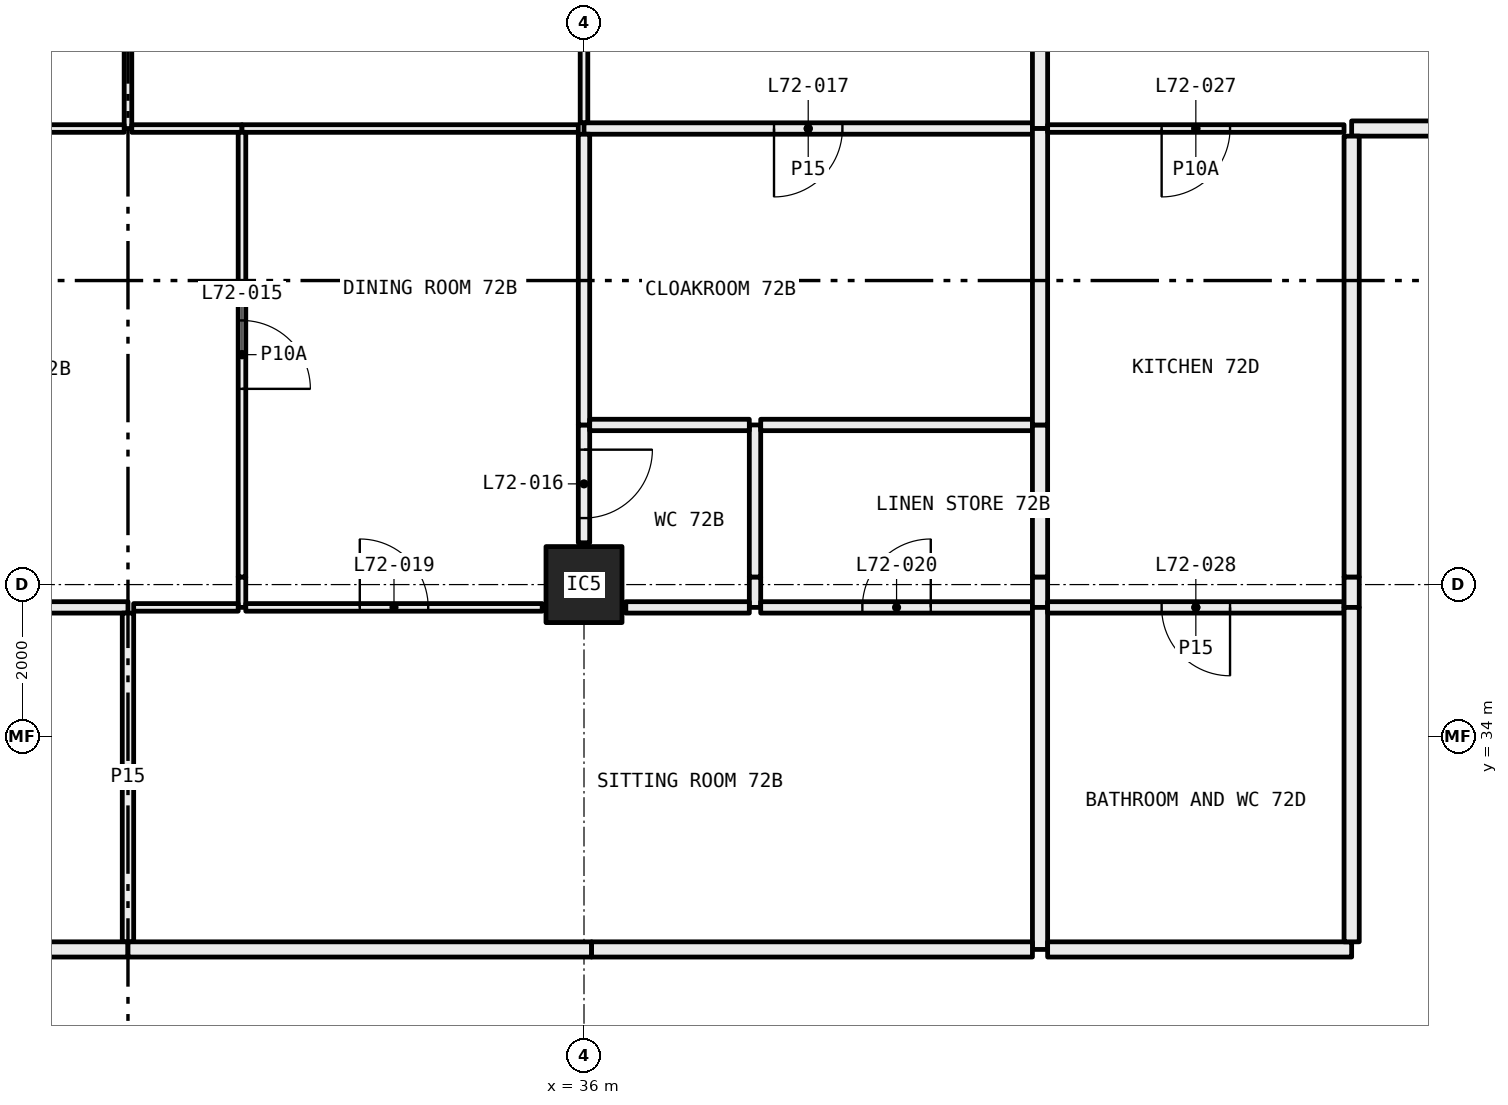
"""IFC4 building model, lengths in metres.
Left out: names, types, materials, properties, quantities, classifications, styles, units other than length and angle.
Written with IfcOpenShell. Run it as: python <this file> out.ifc"""

import sys

from ifc_helpers import new_model, si_unit, direction, frame, frame_2d, origin, origin_2d, place, context, subcontext, project, spatial, rectangle, hollow_rectangle, extrude, element, fill, save


model = new_model("IFC4")
c1 = context("Model", 3, precision=1e-05, world=origin(), true_north=direction((0.0, 1.0)))
c2 = subcontext(c1, "Body", "Model", "MODEL_VIEW")
j1 = project(units=[si_unit("LENGTHUNIT", "METRE"), si_unit("PLANEANGLEUNIT", "RADIAN")], contexts=[c1])
p1 = place(None, origin())
s1 = spatial("IfcSite", under=j1, at=p1, CompositionType="ELEMENT")
p2 = place(p1, origin())
s2 = spatial("IfcBuilding", under=s1, at=p2, CompositionType="ELEMENT")
p3 = place(p2, frame((0.0, 0.0, 266.25)))
s3 = spatial("IfcBuildingStorey", under=s2, at=p3, CompositionType="ELEMENT", Elevation=266.25)
p4 = place(p3, frame((36.0, 36.0, 0.0), z_axis=(0.0, 0.0, 1.0), x_axis=(1.0, 0.0, 0.0)))
e1 = element("IfcColumn", 1, at=p4, inside=s3, PredefinedType="COLUMN", context=c2, shape_type="SweptSolid", body=[
    extrude(hollow_rectangle(XDim=1.0, YDim=1.0, WallThickness=0.04, at=origin_2d()), origin(), (0.0, 0.0, 1.0), 3.05),
])
p5 = place(p3, frame((30.0, 42.0, 0.0), z_axis=(0.0, 0.0, 1.0), x_axis=(0.0, 1.0, 0.0)))
e2 = element("IfcWall", 2, at=p5, inside=s3, PredefinedType="PARTITIONING", context=c2, shape_type="SweptSolid", body=[
    extrude(rectangle(XDim=5.28, YDim=0.1, at=frame_2d((2.64, 0.0))), origin(), (0.0, 0.0, 1.0), 3.05),
])
p6 = place(p5, frame((2.19, 0.0, 0.0)))
e3 = element("IfcOpeningElement", 3, at=p6, cuts=e2, PredefinedType="OPENING", context=c2, shape_type="SweptSolid", body=[
    extrude(rectangle(XDim=0.9, YDim=2.1, at=frame_2d((0.45, 1.05))), frame((0.0, 0.06, 0.0), z_axis=(0.0, -1.0, 0.0), x_axis=(1.0, 0.0, 0.0)), (0.0, 0.0, 1.0), 0.12),
])
p7 = place(p3, frame((26.0, 42.0, 0.0), z_axis=(0.0, 0.0, 1.0), x_axis=(1.0, 0.0, 0.0)))
e4 = element("IfcWall", 4, at=p7, inside=s3, PredefinedType="PARTITIONING", context=c2, shape_type="SweptSolid", body=[
    extrude(rectangle(XDim=3.95, YDim=0.1, at=frame_2d((1.975, 0.0))), origin(), (0.0, 0.0, 1.0), 3.05),
])
p8 = place(p7, frame((1.525, 0.0, 0.0)))
e5 = element("IfcOpeningElement", 5, at=p8, cuts=e4, PredefinedType="OPENING", context=c2, shape_type="SweptSolid", body=[
    extrude(rectangle(XDim=0.9, YDim=2.1, at=frame_2d((0.45, 1.05))), frame((0.0, 0.06, 0.0), z_axis=(0.0, -1.0, 0.0), x_axis=(1.0, 0.0, 0.0)), (0.0, 0.0, 1.0), 0.12),
])
p9 = place(p3, frame((36.0, 42.075, 0.0), z_axis=(0.0, 0.0, 1.0), x_axis=(0.0, 1.0, 0.0)))
e6 = element("IfcWall", 6, at=p9, inside=s3, PredefinedType="PARTITIONING", context=c2, shape_type="SweptSolid", body=[
    extrude(rectangle(XDim=5.205, YDim=0.1, at=frame_2d((2.603, 0.0))), origin(), (0.0, 0.0, 1.0), 2.45),
])
p10 = place(p9, frame((2.153, 0.0, 0.0)))
e7 = element("IfcOpeningElement", 7, at=p10, cuts=e6, PredefinedType="OPENING", context=c2, shape_type="SweptSolid", body=[
    extrude(rectangle(XDim=0.9, YDim=2.1, at=frame_2d((0.45, 1.05))), frame((0.0, 0.06, 0.0), z_axis=(0.0, -1.0, 0.0), x_axis=(1.0, 0.0, 0.0)), (0.0, 0.0, 1.0), 0.12),
])
p11 = place(p3, frame((30.05, 42.0, 0.0), z_axis=(0.0, 0.0, 1.0), x_axis=(1.0, 0.0, 0.0)))
e8 = element("IfcWall", 8, at=p11, inside=s3, PredefinedType="PARTITIONING", context=c2, shape_type="SweptSolid", body=[
    extrude(rectangle(XDim=1.45, YDim=0.1, at=frame_2d((0.725, 0.0))), origin(), (0.0, 0.0, 1.0), 3.05),
])
p12 = place(p3, frame((31.5, 42.0, 0.0), z_axis=(0.0, 0.0, 1.0), x_axis=(1.0, 0.0, 0.0)))
e9 = element("IfcWall", 9, at=p12, inside=s3, PredefinedType="PARTITIONING", context=c2, shape_type="SweptSolid", body=[
    extrude(rectangle(XDim=4.425, YDim=0.1, at=frame_2d((2.212, 0.0))), origin(), (0.0, 0.0, 1.0), 2.45),
])
p13 = place(p3, frame((36.0, 42.0, 0.0), z_axis=(0.0, 0.0, 1.0), x_axis=(1.0, 0.0, 0.0)))
e10 = element("IfcWall", 10, at=p13, inside=s3, PredefinedType="PARTITIONING", context=c2, shape_type="SweptSolid", body=[
    extrude(rectangle(XDim=5.9, YDim=0.15, at=frame_2d((2.95, 0.0))), origin(), (0.0, 0.0, 1.0), 2.45),
])
p14 = place(p13, frame((2.5, 0.0, 0.0)))
e11 = element("IfcOpeningElement", 11, at=p14, cuts=e10, PredefinedType="OPENING", context=c2, shape_type="SweptSolid", body=[
    extrude(rectangle(XDim=0.9, YDim=2.1, at=frame_2d((0.45, 1.05))), frame((0.0, 0.085, 0.0), z_axis=(0.0, -1.0, 0.0), x_axis=(1.0, 0.0, 0.0)), (0.0, 0.0, 1.0), 0.17),
])
p15 = place(p3, frame((42.0, 42.0, 0.0), z_axis=(0.0, 0.0, 1.0), x_axis=(0.0, 1.0, 0.0)))
e12 = element("IfcWall", 12, at=p15, inside=s3, PredefinedType="PARTITIONING", context=c2, shape_type="SweptSolid", body=[
    extrude(rectangle(XDim=5.28, YDim=0.2, at=frame_2d((2.64, 0.0))), origin(), (0.0, 0.0, 1.0), 3.05),
])
p16 = place(p3, frame((31.5, 35.7, 0.0), z_axis=(0.0, 0.0, 1.0), x_axis=(0.0, 1.0, 0.0)))
e13 = element("IfcWall", 13, at=p16, inside=s3, PredefinedType="PARTITIONING", context=c2, shape_type="SweptSolid", body=[
    extrude(rectangle(XDim=0.4, YDim=0.1, at=frame_2d((0.2, 0.0))), origin(), (0.0, 0.0, 1.0), 2.45),
])
p17 = place(p3, frame((31.5, 36.1, 0.0), z_axis=(0.0, 0.0, 1.0), x_axis=(0.0, 1.0, 0.0)))
e14 = element("IfcWall", 14, at=p17, inside=s3, PredefinedType="PARTITIONING", context=c2, shape_type="SweptSolid", body=[
    extrude(rectangle(XDim=5.85, YDim=0.1, at=frame_2d((2.925, 0.0))), origin(), (0.0, 0.0, 1.0), 3.05),
])
p18 = place(p17, frame((2.475, 0.0, 0.0)))
e15 = element("IfcOpeningElement", 15, at=p18, cuts=e14, PredefinedType="OPENING", context=c2, shape_type="SweptSolid", body=[
    extrude(rectangle(XDim=0.9, YDim=2.1, at=frame_2d((0.45, 1.05))), frame((0.0, 0.06, 0.0), z_axis=(0.0, -1.0, 0.0), x_axis=(1.0, 0.0, 0.0)), (0.0, 0.0, 1.0), 0.12),
])
p19 = place(p3, frame((26.0, 35.7, 0.0), z_axis=(0.0, 0.0, 1.0), x_axis=(1.0, 0.0, 0.0)))
e16 = element("IfcWall", 16, at=p19, inside=s3, PredefinedType="PARTITIONING", context=c2, shape_type="SweptSolid", body=[
    extrude(rectangle(XDim=4.0, YDim=0.15, at=frame_2d((2.0, 0.0))), origin(), (0.0, 0.0, 1.0), 3.05),
])
p20 = place(p19, frame((1.55, 0.0, 0.0)))
e17 = element("IfcOpeningElement", 17, at=p20, cuts=e16, PredefinedType="OPENING", context=c2, shape_type="SweptSolid", body=[
    extrude(rectangle(XDim=0.9, YDim=2.1, at=frame_2d((0.45, 1.05))), frame((0.0, 0.085, 0.0), z_axis=(0.0, -1.0, 0.0), x_axis=(1.0, 0.0, 0.0)), (0.0, 0.0, 1.0), 0.17),
])
p21 = place(p3, frame((30.075, 35.7, 0.0), z_axis=(0.0, 0.0, 1.0), x_axis=(1.0, 0.0, 0.0)))
e18 = element("IfcWall", 18, at=p21, inside=s3, PredefinedType="PARTITIONING", context=c2, shape_type="SweptSolid", body=[
    extrude(rectangle(XDim=1.375, YDim=0.1, at=frame_2d((0.688, 0.0))), origin(), (0.0, 0.0, 1.0), 3.05),
])
p22 = place(p3, frame((36.0, 36.55, 0.0), z_axis=(0.0, 0.0, 1.0), x_axis=(0.0, 1.0, 0.0)))
e19 = element("IfcWall", 19, at=p22, inside=s3, PredefinedType="PARTITIONING", context=c2, shape_type="SweptSolid", body=[
    extrude(rectangle(XDim=1.55, YDim=0.15, at=frame_2d((0.775, 0.0))), origin(), (0.0, 0.0, 1.0), 2.45),
])
p23 = place(p22, frame((0.325, 0.0, 0.0)))
e20 = element("IfcOpeningElement", 20, at=p23, cuts=e19, PredefinedType="OPENING", context=c2, shape_type="SweptSolid", body=[
    extrude(rectangle(XDim=0.9, YDim=2.1, at=frame_2d((0.45, 1.05))), frame((0.0, 0.085, 0.0), z_axis=(0.0, -1.0, 0.0), x_axis=(1.0, 0.0, 0.0)), (0.0, 0.0, 1.0), 0.17),
])
p24 = place(p3, frame((36.0, 38.1, 0.0), z_axis=(0.0, 0.0, 1.0), x_axis=(0.0, 1.0, 0.0)))
e21 = element("IfcWall", 21, at=p24, inside=s3, PredefinedType="PARTITIONING", context=c2, shape_type="SweptSolid", body=[
    extrude(rectangle(XDim=3.825, YDim=0.15, at=frame_2d((1.913, 0.0))), origin(), (0.0, 0.0, 1.0), 2.45),
])
p25 = place(p3, frame((31.55, 35.7, 0.0), z_axis=(0.0, 0.0, 1.0), x_axis=(1.0, 0.0, 0.0)))
e22 = element("IfcWall", 22, at=p25, inside=s3, PredefinedType="PARTITIONING", context=c2, shape_type="SweptSolid", body=[
    extrude(rectangle(XDim=3.9, YDim=0.1, at=frame_2d((1.95, 0.0))), origin(), (0.0, 0.0, 1.0), 3.05),
])
p26 = place(p25, frame((1.5, 0.0, 0.0)))
e23 = element("IfcOpeningElement", 23, at=p26, cuts=e22, PredefinedType="OPENING", context=c2, shape_type="SweptSolid", body=[
    extrude(rectangle(XDim=0.9, YDim=2.1, at=frame_2d((0.45, 1.05))), frame((0.0, 0.06, 0.0), z_axis=(0.0, -1.0, 0.0), x_axis=(1.0, 0.0, 0.0)), (0.0, 0.0, 1.0), 0.12),
])
p27 = place(p3, frame((38.25, 35.7, 0.0), z_axis=(0.0, 0.0, 1.0), x_axis=(0.0, 1.0, 0.0)))
e24 = element("IfcWall", 24, at=p27, inside=s3, PredefinedType="PARTITIONING", context=c2, shape_type="SweptSolid", body=[
    extrude(rectangle(XDim=0.4, YDim=0.15, at=frame_2d((0.2, 0.0))), origin(), (0.0, 0.0, 1.0), 2.45),
])
p28 = place(p3, frame((38.25, 36.1, 0.0), z_axis=(0.0, 0.0, 1.0), x_axis=(0.0, 1.0, 0.0)))
e25 = element("IfcWall", 25, at=p28, inside=s3, PredefinedType="PARTITIONING", context=c2, shape_type="SweptSolid", body=[
    extrude(rectangle(XDim=2.0, YDim=0.15, at=frame_2d((1.0, 0.0))), origin(), (0.0, 0.0, 1.0), 3.05),
])
p29 = place(p3, frame((38.175, 38.1, 0.0), z_axis=(0.0, 0.0, 1.0), x_axis=(-1.0, 0.0, 0.0)))
e26 = element("IfcWall", 26, at=p29, inside=s3, PredefinedType="PARTITIONING", context=c2, shape_type="SweptSolid", body=[
    extrude(rectangle(XDim=2.1, YDim=0.15, at=frame_2d((1.05, 0.0))), origin(), (0.0, 0.0, 1.0), 2.45),
])
p30 = place(p3, frame((36.55, 35.7, 0.0), z_axis=(0.0, 0.0, 1.0), x_axis=(1.0, 0.0, 0.0)))
e27 = element("IfcWall", 27, at=p30, inside=s3, PredefinedType="PARTITIONING", context=c2, shape_type="SweptSolid", body=[
    extrude(rectangle(XDim=1.625, YDim=0.15, at=frame_2d((0.812, 0.0))), origin(), (0.0, 0.0, 1.0), 3.05),
])
p31 = place(p3, frame((41.9, 38.1, 0.0), z_axis=(0.0, 0.0, 1.0), x_axis=(-1.0, 0.0, 0.0)))
e28 = element("IfcWall", 28, at=p31, inside=s3, PredefinedType="PARTITIONING", context=c2, shape_type="SweptSolid", body=[
    extrude(rectangle(XDim=3.575, YDim=0.15, at=frame_2d((1.788, 0.0))), origin(), (0.0, 0.0, 1.0), 3.05),
])
p32 = place(p3, frame((38.325, 35.7, 0.0), z_axis=(0.0, 0.0, 1.0), x_axis=(1.0, 0.0, 0.0)))
e29 = element("IfcWall", 29, at=p32, inside=s3, PredefinedType="PARTITIONING", context=c2, shape_type="SweptSolid", body=[
    extrude(rectangle(XDim=3.575, YDim=0.15, at=frame_2d((1.788, 0.0))), origin(), (0.0, 0.0, 1.0), 3.05),
])
p33 = place(p32, frame((1.337, 0.0, 0.0)))
e30 = element("IfcOpeningElement", 30, at=p33, cuts=e29, PredefinedType="OPENING", context=c2, shape_type="SweptSolid", body=[
    extrude(rectangle(XDim=0.9, YDim=2.1, at=frame_2d((0.45, 1.05))), frame((0.0, 0.085, 0.0), z_axis=(0.0, -1.0, 0.0), x_axis=(1.0, 0.0, 0.0)), (0.0, 0.0, 1.0), 0.17),
])
p34 = place(p3, frame((42.0, 35.7, 0.0), z_axis=(0.0, 0.0, 1.0), x_axis=(0.0, 1.0, 0.0)))
e31 = element("IfcWall", 31, at=p34, inside=s3, PredefinedType="PARTITIONING", context=c2, shape_type="SweptSolid", body=[
    extrude(rectangle(XDim=0.4, YDim=0.2, at=frame_2d((0.2, 0.0))), origin(), (0.0, 0.0, 1.0), 2.45),
])
p35 = place(p3, frame((42.0, 36.1, 0.0), z_axis=(0.0, 0.0, 1.0), x_axis=(0.0, 1.0, 0.0)))
e32 = element("IfcWall", 32, at=p35, inside=s3, PredefinedType="PARTITIONING", context=c2, shape_type="SweptSolid", body=[
    extrude(rectangle(XDim=2.0, YDim=0.2, at=frame_2d((1.0, 0.0))), origin(), (0.0, 0.0, 1.0), 3.05),
])
p36 = place(p3, frame((42.0, 38.1, 0.0), z_axis=(0.0, 0.0, 1.0), x_axis=(0.0, 1.0, 0.0)))
e33 = element("IfcWall", 33, at=p36, inside=s3, PredefinedType="PARTITIONING", context=c2, shape_type="SweptSolid", body=[
    extrude(rectangle(XDim=3.9, YDim=0.2, at=frame_2d((1.95, 0.0))), origin(), (0.0, 0.0, 1.0), 3.05),
])
p37 = place(p3, frame((30.0, 31.3, 0.0), z_axis=(0.0, 0.0, 1.0), x_axis=(0.0, 1.0, 0.0)))
e34 = element("IfcWall", 34, at=p37, inside=s3, PredefinedType="PARTITIONING", context=c2, shape_type="SweptSolid", body=[
    extrude(rectangle(XDim=4.325, YDim=0.15, at=frame_2d((2.163, 0.0))), origin(), (0.0, 0.0, 1.0), 3.05),
])
p38 = place(p3, frame((26.0, 31.2, 0.0), z_axis=(0.0, 0.0, 1.0), x_axis=(1.0, 0.0, 0.0)))
e35 = element("IfcWall", 35, at=p38, inside=s3, PredefinedType="PARTITIONING", context=c2, shape_type="SweptSolid", body=[
    extrude(rectangle(XDim=4.0, YDim=0.2, at=frame_2d((2.0, 0.0))), origin(), (0.0, 0.0, 1.0), 3.05),
])
p39 = place(p3, frame((42.0, 31.2, 0.0), z_axis=(0.0, 0.0, 1.0), x_axis=(0.0, 1.0, 0.0)))
e36 = element("IfcWall", 36, at=p39, inside=s3, PredefinedType="PARTITIONING", context=c2, shape_type="SweptSolid", body=[
    extrude(rectangle(XDim=4.5, YDim=0.2, at=frame_2d((2.25, 0.0))), origin(), (0.0, 0.0, 1.0), 3.05),
])
p40 = place(p3, frame((30.0, 31.2, 0.0), z_axis=(0.0, 0.0, 1.0), x_axis=(1.0, 0.0, 0.0)))
e37 = element("IfcWall", 37, at=p40, inside=s3, PredefinedType="PARTITIONING", context=c2, shape_type="SweptSolid", body=[
    extrude(rectangle(XDim=6.1, YDim=0.2, at=frame_2d((3.05, 0.0))), origin(), (0.0, 0.0, 1.0), 2.45),
])
p41 = place(p3, frame((36.1, 31.2, 0.0), z_axis=(0.0, 0.0, 1.0), x_axis=(1.0, 0.0, 0.0)))
e38 = element("IfcWall", 38, at=p41, inside=s3, PredefinedType="PARTITIONING", context=c2, shape_type="SweptSolid", body=[
    extrude(rectangle(XDim=5.8, YDim=0.2, at=frame_2d((2.9, 0.0))), origin(), (0.0, 0.0, 1.0), 3.05),
])
p42 = place(p3, frame((42.1, 42.0, 0.0), z_axis=(0.0, 0.0, 1.0), x_axis=(1.0, 0.0, 0.0)))
e39 = element("IfcWall", 39, at=p42, inside=s3, PredefinedType="PARTITIONING", context=c2, shape_type="SweptSolid", body=[
    extrude(rectangle(XDim=3.9, YDim=0.1, at=frame_2d((1.95, 0.0))), origin(), (0.0, 0.0, 1.0), 3.05),
])
p43 = place(p42, frame((1.5, 0.0, 0.0)))
e40 = element("IfcOpeningElement", 40, at=p43, cuts=e39, PredefinedType="OPENING", context=c2, shape_type="SweptSolid", body=[
    extrude(rectangle(XDim=0.9, YDim=2.1, at=frame_2d((0.45, 1.05))), frame((0.0, 0.06, 0.0), z_axis=(0.0, -1.0, 0.0), x_axis=(1.0, 0.0, 0.0)), (0.0, 0.0, 1.0), 0.12),
])
p44 = place(p3, frame((46.1, 42.0, 0.0), z_axis=(0.0, 0.0, 1.0), x_axis=(1.0, 0.0, 0.0)))
e41 = element("IfcWall", 41, at=p44, inside=s3, PredefinedType="PARTITIONING", context=c2, shape_type="SweptSolid", body=[
    extrude(rectangle(XDim=1.9, YDim=0.2, at=frame_2d((0.95, 0.0))), origin(), (0.0, 0.0, 1.0), 3.05),
])
p45 = place(p3, frame((42.1, 35.7, 0.0), z_axis=(0.0, 0.0, 1.0), x_axis=(1.0, 0.0, 0.0)))
e42 = element("IfcWall", 42, at=p45, inside=s3, PredefinedType="PARTITIONING", context=c2, shape_type="SweptSolid", body=[
    extrude(rectangle(XDim=3.9, YDim=0.15, at=frame_2d((1.95, 0.0))), origin(), (0.0, 0.0, 1.0), 3.05),
])
p46 = place(p45, frame((1.5, 0.0, 0.0)))
e43 = element("IfcOpeningElement", 43, at=p46, cuts=e42, PredefinedType="OPENING", context=c2, shape_type="SweptSolid", body=[
    extrude(rectangle(XDim=0.9, YDim=2.1, at=frame_2d((0.45, 1.05))), frame((0.0, 0.085, 0.0), z_axis=(0.0, -1.0, 0.0), x_axis=(1.0, 0.0, 0.0)), (0.0, 0.0, 1.0), 0.17),
])
p47 = place(p3, frame((46.1, 35.7, 0.0), z_axis=(0.0, 0.0, 1.0), x_axis=(0.0, 1.0, 0.0)))
e44 = element("IfcWall", 44, at=p47, inside=s3, PredefinedType="PARTITIONING", context=c2, shape_type="SweptSolid", body=[
    extrude(rectangle(XDim=0.4, YDim=0.2, at=frame_2d((0.2, 0.0))), origin(), (0.0, 0.0, 1.0), 2.45),
])
p48 = place(p3, frame((46.1, 36.1, 0.0), z_axis=(0.0, 0.0, 1.0), x_axis=(0.0, 1.0, 0.0)))
e45 = element("IfcWall", 45, at=p48, inside=s3, PredefinedType="PARTITIONING", context=c2, shape_type="SweptSolid", body=[
    extrude(rectangle(XDim=5.8, YDim=0.2, at=frame_2d((2.9, 0.0))), origin(), (0.0, 0.0, 1.0), 3.05),
])
p49 = place(p3, frame((42.1, 31.2, 0.0), z_axis=(0.0, 0.0, 1.0), x_axis=(1.0, 0.0, 0.0)))
e46 = element("IfcWall", 46, at=p49, inside=s3, PredefinedType="PARTITIONING", context=c2, shape_type="SweptSolid", body=[
    extrude(rectangle(XDim=4.0, YDim=0.2, at=frame_2d((2.0, 0.0))), origin(), (0.0, 0.0, 1.0), 3.05),
])
p50 = place(p3, frame((46.1, 31.3, 0.0), z_axis=(0.0, 0.0, 1.0), x_axis=(0.0, 1.0, 0.0)))
e47 = element("IfcWall", 47, at=p50, inside=s3, PredefinedType="PARTITIONING", context=c2, shape_type="SweptSolid", body=[
    extrude(rectangle(XDim=4.4, YDim=0.2, at=frame_2d((2.2, 0.0))), origin(), (0.0, 0.0, 1.0), 3.05),
])
p51 = place(p18, frame((0.9, 0.0, 0.0), x_axis=(-1.0, 0.0, 0.0)))
e48 = element("IfcDoor", 48, at=p51, inside=s3, OperationType="SINGLE_SWING_LEFT", PredefinedType="DOOR", context=c2, shape_type="SweptSolid", body=[
    extrude(rectangle(XDim=0.9, YDim=2.1, at=frame_2d((0.45, 1.05))), frame((0.0, 0.025, 0.0), z_axis=(0.0, -1.0, 0.0), x_axis=(1.0, 0.0, 0.0)), (0.0, 0.0, 1.0), 0.05),
])
fill(e15, e48)
p52 = place(p23, frame((0.9, 0.0, 0.0), x_axis=(-1.0, 0.0, 0.0)))
e49 = element("IfcDoor", 49, at=p52, inside=s3, OperationType="SINGLE_SWING_RIGHT", PredefinedType="DOOR", context=c2, shape_type="SweptSolid", body=[
    extrude(rectangle(XDim=0.9, YDim=2.1, at=frame_2d((0.45, 1.05))), frame((0.0, 0.025, 0.0), z_axis=(0.0, -1.0, 0.0), x_axis=(1.0, 0.0, 0.0)), (0.0, 0.0, 1.0), 0.05),
])
fill(e20, e49)
p53 = place(p14, frame((0.9, 0.0, 0.0), x_axis=(-1.0, 0.0, 0.0)))
e50 = element("IfcDoor", 50, at=p53, inside=s3, OperationType="SINGLE_SWING_LEFT", PredefinedType="DOOR", context=c2, shape_type="SweptSolid", body=[
    extrude(rectangle(XDim=0.9, YDim=2.1, at=frame_2d((0.45, 1.05))), frame((0.0, 0.025, 0.0), z_axis=(0.0, -1.0, 0.0), x_axis=(1.0, 0.0, 0.0)), (0.0, 0.0, 1.0), 0.05),
])
fill(e11, e50)
p54 = place(p26, origin())
e51 = element("IfcDoor", 51, at=p54, inside=s3, OperationType="SINGLE_SWING_RIGHT", PredefinedType="DOOR", context=c2, shape_type="SweptSolid", body=[
    extrude(rectangle(XDim=0.9, YDim=2.1, at=frame_2d((0.45, 1.05))), frame((0.0, 0.025, 0.0), z_axis=(0.0, -1.0, 0.0), x_axis=(1.0, 0.0, 0.0)), (0.0, 0.0, 1.0), 0.05),
])
fill(e23, e51)
p55 = place(p33, origin())
e52 = element("IfcDoor", 52, at=p55, inside=s3, OperationType="SINGLE_SWING_LEFT", PredefinedType="DOOR", context=c2, shape_type="SweptSolid", body=[
    extrude(rectangle(XDim=0.9, YDim=2.1, at=frame_2d((0.45, 1.05))), frame((0.0, 0.025, 0.0), z_axis=(0.0, -1.0, 0.0), x_axis=(1.0, 0.0, 0.0)), (0.0, 0.0, 1.0), 0.05),
])
fill(e30, e52)
p56 = place(p43, frame((0.9, 0.0, 0.0), x_axis=(-1.0, 0.0, 0.0)))
e53 = element("IfcDoor", 53, at=p56, inside=s3, OperationType="SINGLE_SWING_LEFT", PredefinedType="DOOR", context=c2, shape_type="SweptSolid", body=[
    extrude(rectangle(XDim=0.9, YDim=2.1, at=frame_2d((0.45, 1.05))), frame((0.0, 0.025, 0.0), z_axis=(0.0, -1.0, 0.0), x_axis=(1.0, 0.0, 0.0)), (0.0, 0.0, 1.0), 0.05),
])
fill(e40, e53)
p57 = place(p46, frame((0.9, 0.0, 0.0), x_axis=(-1.0, 0.0, 0.0)))
e54 = element("IfcDoor", 54, at=p57, inside=s3, OperationType="SINGLE_SWING_RIGHT", PredefinedType="DOOR", context=c2, shape_type="SweptSolid", body=[
    extrude(rectangle(XDim=0.9, YDim=2.1, at=frame_2d((0.45, 1.05))), frame((0.0, 0.025, 0.0), z_axis=(0.0, -1.0, 0.0), x_axis=(1.0, 0.0, 0.0)), (0.0, 0.0, 1.0), 0.05),
])
fill(e43, e54)
save(model, sys.argv[1])
